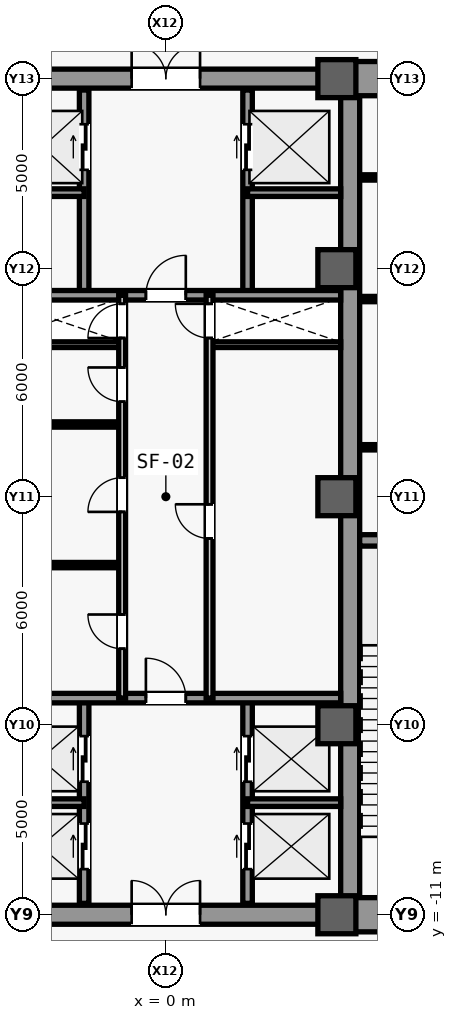
"""IFC4 building model, lengths in metres.
Left out: names, types, materials, properties, quantities, classifications, styles, units other than length and angle.
Written with IfcOpenShell. Run it as: python <this file> out.ifc"""

import sys

from ifc_helpers import new_model, si_unit, direction, frame, frame_2d, origin, origin_2d, place, context, subcontext, project, spatial, rectangle, extrude, source, transform, mapped, element, fill, save


model = new_model("IFC4")
c1 = context("Model", 3, precision=1e-05, world=origin(), true_north=direction((0.0, 1.0)))
c2 = subcontext(c1, "Body", "Model", "MODEL_VIEW")
j1 = project(units=[si_unit("LENGTHUNIT", "METRE"), si_unit("PLANEANGLEUNIT", "RADIAN")], contexts=[c1])
p1 = place(None, origin())
s1 = spatial("IfcSite", under=j1, at=p1, CompositionType="ELEMENT")
p2 = place(p1, origin())
s2 = spatial("IfcBuilding", under=s1, at=p2, CompositionType="ELEMENT")
p3 = place(p2, origin())
s3 = spatial("IfcBuildingStorey", under=s2, at=p3, CompositionType="ELEMENT", Elevation=0.0)
m1 = source(origin(), c2, "Body", "SweptSolid", [
    extrude(rectangle(XDim=21.4, YDim=0.5, at=frame_2d((10.7, 0.0))), origin(), (0.0, 0.0, 1.0), 6.28),
])
p4 = place(p3, frame((4.85, -10.7, 0.0), z_axis=(0.0, 0.0, 1.0), x_axis=(0.0, 1.0, 0.0)))
e1 = element("IfcWall", 1, at=p4, inside=s3, PredefinedType="SHEAR", context=c2, shape_type="MappedRepresentation", body=[
    mapped(m1, transform((0.0, 0.0, 0.0), scale=1.0)),
])
m2 = source(origin(), c2, "Body", "SweptSolid", [
    extrude(rectangle(XDim=5.85, YDim=0.9, at=frame_2d((2.925, 0.0))), origin(), (0.0, 0.0, 1.0), 6.28),
])
p5 = place(p3, frame((4.85, -11.0, 0.0), z_axis=(0.0, 0.0, 1.0), x_axis=(1.0, 0.0, 0.0)))
e2 = element("IfcWall", 2, at=p5, inside=s3, PredefinedType="SHEAR", context=c2, shape_type="MappedRepresentation", body=[
    mapped(m2, transform((0.0, 0.0, 0.0), scale=1.0)),
])
p6 = place(p3, frame((4.85, 11.0, 0.0), z_axis=(0.0, 0.0, 1.0), x_axis=(1.0, 0.0, 0.0)))
e3 = element("IfcWall", 3, at=p6, inside=s3, PredefinedType="SHEAR", context=c2, shape_type="MappedRepresentation", body=[
    mapped(m2, transform((0.0, 0.0, 0.0), scale=1.0)),
])
m3 = source(origin(), c2, "Body", "SweptSolid", [
    extrude(rectangle(XDim=1.05, YDim=2.2, at=frame_2d((0.525, 1.1))), frame((0.0, 0.46, 0.0), z_axis=(0.0, -1.0, 0.0), x_axis=(1.0, 0.0, 0.0)), (0.0, 0.0, 1.0), 0.92),
])
p7 = place(p6, frame((1.375, 0.0, 0.0)))
e4 = element("IfcOpeningElement", 4, at=p7, cuts=e3, PredefinedType="OPENING", context=c2, shape_type="MappedRepresentation", body=[
    mapped(m3, transform((0.0, 0.0, 0.0), scale=1.0)),
])
m4 = source(origin(), c2, "Body", "SweptSolid", [
    extrude(rectangle(XDim=5.6, YDim=0.3, at=frame_2d((2.8, 0.0))), origin(), (0.0, 0.0, 1.0), 6.28),
])
p8 = place(p3, frame((5.1, -1.15, 0.0), z_axis=(0.0, 0.0, 1.0), x_axis=(1.0, 0.0, 0.0)))
e5 = element("IfcWall", 5, at=p8, inside=s3, PredefinedType="SHEAR", context=c2, shape_type="MappedRepresentation", body=[
    mapped(m4, transform((0.0, 0.0, 0.0), scale=1.0)),
])
m5 = source(origin(), c2, "Body", "SweptSolid", [
    extrude(rectangle(XDim=9.2, YDim=0.5, at=frame_2d((4.6, 0.0))), origin(), (0.0, 0.0, 1.0), 6.28),
])
p9 = place(p3, frame((-4.6, -11.0, 0.0), z_axis=(0.0, 0.0, 1.0), x_axis=(1.0, 0.0, 0.0)))
e6 = element("IfcWall", 6, at=p9, inside=s3, PredefinedType="SHEAR", context=c2, shape_type="MappedRepresentation", body=[
    mapped(m5, transform((0.0, 0.0, 0.0), scale=1.0)),
])
m6 = source(origin(), c2, "Body", "SweptSolid", [
    extrude(rectangle(XDim=1.8, YDim=2.25, at=frame_2d((0.9, 1.125))), frame((0.0, 0.26, 0.0), z_axis=(0.0, -1.0, 0.0), x_axis=(1.0, 0.0, 0.0)), (0.0, 0.0, 1.0), 0.52),
])
p10 = place(p9, frame((3.7, 0.0, 0.0)))
e7 = element("IfcOpeningElement", 7, at=p10, cuts=e6, PredefinedType="OPENING", context=c2, shape_type="MappedRepresentation", body=[
    mapped(m6, transform((0.0, 0.0, 0.0), scale=1.0)),
])
p11 = place(p3, frame((-4.6, 11.0, 0.0), z_axis=(0.0, 0.0, 1.0), x_axis=(1.0, 0.0, 0.0)))
e8 = element("IfcWall", 8, at=p11, inside=s3, PredefinedType="SHEAR", context=c2, shape_type="MappedRepresentation", body=[
    mapped(m5, transform((0.0, 0.0, 0.0), scale=1.0)),
])
p12 = place(p11, frame((3.7, 0.0, 0.0)))
e9 = element("IfcOpeningElement", 9, at=p12, cuts=e8, PredefinedType="OPENING", context=c2, shape_type="MappedRepresentation", body=[
    mapped(m6, transform((0.0, 0.0, 0.0), scale=1.0)),
])
m7 = source(origin(), c2, "Body", "SweptSolid", [
    extrude(rectangle(XDim=1.0, YDim=1.0, at=origin_2d()), origin(), (0.0, 0.0, 1.0), 6.6),
])
for number, where, z_axis, x_axis in (
    (10, (4.5, -11.0, 0.0), (0.0, 0.0, 1.0), (1.0, 0.0, 0.0)),
    (11, (4.5, -6.0, 0.0), (0.0, 0.0, 1.0), (1.0, 0.0, 0.0)),
    (12, (4.5, 0.0, 0.0), (0.0, 0.0, 1.0), (1.0, 0.0, 0.0)),
    (13, (4.5, 6.0, 0.0), (0.0, 0.0, 1.0), (1.0, 0.0, 0.0)),
    (14, (4.5, 11.0, 0.0), (0.0, 0.0, 1.0), (1.0, 0.0, 0.0)),
):
    element("IfcColumn", number, at=place(p3, frame(where, z_axis=z_axis, x_axis=x_axis)), inside=s3, PredefinedType="COLUMN", context=c2, shape_type="MappedRepresentation", body=[
        mapped(m7, transform((0.0, 0.0, 0.0), scale=1.0)),
    ])
m8 = source(origin(), c2, "Body", "SweptSolid", [
    extrude(rectangle(XDim=3.15, YDim=0.14, at=frame_2d((1.575, 0.0))), origin(), (0.0, 0.0, 1.0), 6.28),
])
p13 = place(p3, frame((5.1, 1.3, 0.0), z_axis=(0.0, 0.0, 1.0), x_axis=(1.0, 0.0, 0.0)))
e15 = element("IfcWall", 15, at=p13, inside=s3, PredefinedType="PARTITIONING", context=c2, shape_type="MappedRepresentation", body=[
    mapped(m8, transform((0.0, 0.0, 0.0), scale=1.0)),
])
p14 = place(p3, frame((5.1, 8.4, 0.0), z_axis=(0.0, 0.0, 1.0), x_axis=(1.0, 0.0, 0.0)))
e16 = element("IfcWall", 16, at=p14, inside=s3, PredefinedType="PARTITIONING", context=c2, shape_type="MappedRepresentation", body=[
    mapped(m8, transform((0.0, 0.0, 0.0), scale=1.0)),
])
m9 = source(origin(), c2, "Body", "SweptSolid", [
    extrude(rectangle(XDim=0.9, YDim=2.15, at=frame_2d((0.45, 1.075))), frame((0.0, 0.08, 0.0), z_axis=(0.0, -1.0, 0.0), x_axis=(1.0, 0.0, 0.0)), (0.0, 0.0, 1.0), 0.16),
])
p15 = place(p14, frame((1.13, 0.0, 0.0)))
e17 = element("IfcOpeningElement", 17, at=p15, cuts=e16, PredefinedType="OPENING", context=c2, shape_type="MappedRepresentation", body=[
    mapped(m9, transform((0.0, 0.0, 0.0), scale=1.0)),
])
p16 = place(p3, frame((5.1, 5.2, 0.0), z_axis=(0.0, 0.0, 1.0), x_axis=(1.0, 0.0, 0.0)))
e18 = element("IfcWall", 18, at=p16, inside=s3, PredefinedType="PARTITIONING", context=c2, shape_type="MappedRepresentation", body=[
    mapped(m8, transform((0.0, 0.0, 0.0), scale=1.0)),
])
p17 = place(p16, frame((1.13, 0.0, 0.0)))
e19 = element("IfcOpeningElement", 19, at=p17, cuts=e18, PredefinedType="OPENING", context=c2, shape_type="MappedRepresentation", body=[
    mapped(m9, transform((0.0, 0.0, 0.0), scale=1.0)),
])
m10 = source(origin(), c2, "Body", "SweptSolid", [
    extrude(rectangle(XDim=3.45, YDim=0.15, at=frame_2d((1.725, 0.0))), origin(), (0.0, 0.0, 1.0), 6.28),
])
for number, where, z_axis, x_axis in (
    (20, (-4.6, 4.0, 0.0), (0.0, 0.0, 1.0), (1.0, 0.0, 0.0)),
    (21, (1.15, 4.0, 0.0), (0.0, 0.0, 1.0), (1.0, 0.0, 0.0)),
):
    element("IfcWall", number, at=place(p3, frame(where, z_axis=z_axis, x_axis=x_axis)), inside=s3, PredefinedType="PARTITIONING", context=c2, shape_type="MappedRepresentation", body=[
        mapped(m10, transform((0.0, 0.0, 0.0), scale=1.0)),
    ])
m11 = source(origin(), c2, "Body", "SweptSolid", [
    extrude(rectangle(XDim=5.4, YDim=0.25, at=frame_2d((2.7, 0.0))), origin(), (0.0, 0.0, 1.0), 6.28),
])
p18 = place(p3, frame((-2.15, -10.7, 0.0), z_axis=(0.0, 0.0, 1.0), x_axis=(0.0, 1.0, 0.0)))
e22 = element("IfcWall", 22, at=p18, inside=s3, PredefinedType="SHEAR", context=c2, shape_type="MappedRepresentation", body=[
    mapped(m11, transform((0.0, 0.0, 0.0), scale=1.0)),
])
m12 = source(origin(), c2, "Body", "SweptSolid", [
    extrude(rectangle(XDim=1.2, YDim=2.3, at=frame_2d((0.6, 1.15))), frame((0.0, 0.135, 0.0), z_axis=(0.0, -1.0, 0.0), x_axis=(1.0, 0.0, 0.0)), (0.0, 0.0, 1.0), 0.27),
])
p19 = place(p18, frame((0.9, 0.0, 0.0)))
e23 = element("IfcOpeningElement", 23, at=p19, cuts=e22, PredefinedType="OPENING", context=c2, shape_type="MappedRepresentation", body=[
    mapped(m12, transform((0.0, 0.0, 0.0), scale=1.0)),
])
p20 = place(p18, frame((3.2, 0.0, 0.0)))
e24 = element("IfcOpeningElement", 24, at=p20, cuts=e22, PredefinedType="OPENING", context=c2, shape_type="MappedRepresentation", body=[
    mapped(m12, transform((0.0, 0.0, 0.0), scale=1.0)),
])
p21 = place(p3, frame((2.15, -10.7, 0.0), z_axis=(0.0, 0.0, 1.0), x_axis=(0.0, 1.0, 0.0)))
e25 = element("IfcWall", 25, at=p21, inside=s3, PredefinedType="SHEAR", context=c2, shape_type="MappedRepresentation", body=[
    mapped(m11, transform((0.0, 0.0, 0.0), scale=1.0)),
])
p22 = place(p21, frame((0.9, 0.0, 0.0)))
e26 = element("IfcOpeningElement", 26, at=p22, cuts=e25, PredefinedType="OPENING", context=c2, shape_type="MappedRepresentation", body=[
    mapped(m12, transform((0.0, 0.0, 0.0), scale=1.0)),
])
p23 = place(p21, frame((3.2, 0.0, 0.0)))
e27 = element("IfcOpeningElement", 27, at=p23, cuts=e25, PredefinedType="OPENING", context=c2, shape_type="MappedRepresentation", body=[
    mapped(m12, transform((0.0, 0.0, 0.0), scale=1.0)),
])
m13 = source(origin(), c2, "Body", "SweptSolid", [
    extrude(rectangle(XDim=2.45, YDim=0.2, at=frame_2d((1.225, 0.0))), origin(), (0.0, 0.0, 1.0), 6.28),
])
for number, where, z_axis, x_axis in (
    (28, (-4.6, -8.05, 0.0), (0.0, 0.0, 1.0), (1.0, 0.0, 0.0)),
    (29, (2.15, -8.05, 0.0), (0.0, 0.0, 1.0), (1.0, 0.0, 0.0)),
):
    element("IfcWall", number, at=place(p3, frame(where, z_axis=z_axis, x_axis=x_axis)), inside=s3, PredefinedType="SHEAR", context=c2, shape_type="MappedRepresentation", body=[
        mapped(m13, transform((0.0, 0.0, 0.0), scale=1.0)),
    ])
m14 = source(origin(), c2, "Body", "SweptSolid", [
    extrude(rectangle(XDim=9.2, YDim=0.25, at=frame_2d((4.6, 0.0))), origin(), (0.0, 0.0, 1.0), 6.28),
])
p24 = place(p3, frame((-4.6, -5.3, 0.0), z_axis=(0.0, 0.0, 1.0), x_axis=(1.0, 0.0, 0.0)))
e30 = element("IfcWall", 30, at=p24, inside=s3, PredefinedType="SHEAR", context=c2, shape_type="MappedRepresentation", body=[
    mapped(m14, transform((0.0, 0.0, 0.0), scale=1.0)),
])
m15 = source(origin(), c2, "Body", "SweptSolid", [
    extrude(rectangle(XDim=1.05, YDim=2.2, at=frame_2d((0.525, 1.1))), frame((0.0, 0.135, 0.0), z_axis=(0.0, -1.0, 0.0), x_axis=(1.0, 0.0, 0.0)), (0.0, 0.0, 1.0), 0.27),
])
p25 = place(p24, frame((4.075, 0.0, 0.0)))
e31 = element("IfcOpeningElement", 31, at=p25, cuts=e30, PredefinedType="OPENING", context=c2, shape_type="MappedRepresentation", body=[
    mapped(m15, transform((0.0, 0.0, 0.0), scale=1.0)),
])
p26 = place(p3, frame((-2.15, 5.3, 0.0), z_axis=(0.0, 0.0, 1.0), x_axis=(0.0, 1.0, 0.0)))
e32 = element("IfcWall", 32, at=p26, inside=s3, PredefinedType="SHEAR", context=c2, shape_type="MappedRepresentation", body=[
    mapped(m11, transform((0.0, 0.0, 0.0), scale=1.0)),
])
p27 = place(p26, frame((3.3, 0.0, 0.0)))
e33 = element("IfcOpeningElement", 33, at=p27, cuts=e32, PredefinedType="OPENING", context=c2, shape_type="MappedRepresentation", body=[
    mapped(m12, transform((0.0, 0.0, 0.0), scale=1.0)),
])
p28 = place(p3, frame((2.15, 5.3, 0.0), z_axis=(0.0, 0.0, 1.0), x_axis=(0.0, 1.0, 0.0)))
e34 = element("IfcWall", 34, at=p28, inside=s3, PredefinedType="SHEAR", context=c2, shape_type="MappedRepresentation", body=[
    mapped(m11, transform((0.0, 0.0, 0.0), scale=1.0)),
])
p29 = place(p28, frame((3.3, 0.0, 0.0)))
e35 = element("IfcOpeningElement", 35, at=p29, cuts=e34, PredefinedType="OPENING", context=c2, shape_type="MappedRepresentation", body=[
    mapped(m12, transform((0.0, 0.0, 0.0), scale=1.0)),
])
for number, where, z_axis, x_axis in (
    (36, (-4.6, 8.0, 0.0), (0.0, 0.0, 1.0), (1.0, 0.0, 0.0)),
    (37, (2.15, 8.0, 0.0), (0.0, 0.0, 1.0), (1.0, 0.0, 0.0)),
):
    element("IfcWall", number, at=place(p3, frame(where, z_axis=z_axis, x_axis=x_axis)), inside=s3, PredefinedType="SHEAR", context=c2, shape_type="MappedRepresentation", body=[
        mapped(m13, transform((0.0, 0.0, 0.0), scale=1.0)),
    ])
p30 = place(p3, frame((-4.6, 5.3, 0.0), z_axis=(0.0, 0.0, 1.0), x_axis=(1.0, 0.0, 0.0)))
e38 = element("IfcWall", 38, at=p30, inside=s3, PredefinedType="SHEAR", context=c2, shape_type="MappedRepresentation", body=[
    mapped(m14, transform((0.0, 0.0, 0.0), scale=1.0)),
])
p31 = place(p30, frame((4.075, 0.0, 0.0)))
e39 = element("IfcOpeningElement", 39, at=p31, cuts=e38, PredefinedType="OPENING", context=c2, shape_type="MappedRepresentation", body=[
    mapped(m15, transform((0.0, 0.0, 0.0), scale=1.0)),
])
m16 = source(origin(), c2, "Body", "SweptSolid", [
    extrude(rectangle(XDim=3.45, YDim=0.14, at=frame_2d((1.725, 0.0))), origin(), (0.0, 0.0, 1.0), 6.28),
])
for number, where, z_axis, x_axis in (
    (40, (-4.6, -1.8, 0.0), (0.0, 0.0, 1.0), (1.0, 0.0, 0.0)),
    (41, (-4.6, 1.9, 0.0), (0.0, 0.0, 1.0), (1.0, 0.0, 0.0)),
):
    element("IfcWall", number, at=place(p3, frame(where, z_axis=z_axis, x_axis=x_axis)), inside=s3, PredefinedType="PARTITIONING", context=c2, shape_type="MappedRepresentation", body=[
        mapped(m16, transform((0.0, 0.0, 0.0), scale=1.0)),
    ])
m17 = source(origin(), c2, "Body", "SweptSolid", [
    extrude(rectangle(XDim=10.6, YDim=0.18, at=frame_2d((5.3, 0.0))), origin(), (0.0, 0.0, 1.0), 6.28),
])
p32 = place(p3, frame((-1.15, -5.3, 0.0), z_axis=(0.0, 0.0, 1.0), x_axis=(0.0, 1.0, 0.0)))
e42 = element("IfcWall", 42, at=p32, inside=s3, PredefinedType="PARTITIONING", context=c2, shape_type="MappedRepresentation", body=[
    mapped(m17, transform((0.0, 0.0, 0.0), scale=1.0)),
])
m18 = source(origin(), c2, "Body", "SweptSolid", [
    extrude(rectangle(XDim=0.9, YDim=2.15, at=frame_2d((0.45, 1.075))), frame((0.0, 0.1, 0.0), z_axis=(0.0, -1.0, 0.0), x_axis=(1.0, 0.0, 0.0)), (0.0, 0.0, 1.0), 0.2),
])
p33 = place(p32, frame((1.3, 0.0, 0.0)))
e43 = element("IfcOpeningElement", 43, at=p33, cuts=e42, PredefinedType="OPENING", context=c2, shape_type="MappedRepresentation", body=[
    mapped(m18, transform((0.0, 0.0, 0.0), scale=1.0)),
])
p34 = place(p32, frame((4.9, 0.0, 0.0)))
e44 = element("IfcOpeningElement", 44, at=p34, cuts=e42, PredefinedType="OPENING", context=c2, shape_type="MappedRepresentation", body=[
    mapped(m18, transform((0.0, 0.0, 0.0), scale=1.0)),
])
p35 = place(p32, frame((7.8, 0.0, 0.0)))
e45 = element("IfcOpeningElement", 45, at=p35, cuts=e42, PredefinedType="OPENING", context=c2, shape_type="MappedRepresentation", body=[
    mapped(m18, transform((0.0, 0.0, 0.0), scale=1.0)),
])
p36 = place(p32, frame((9.475, 0.0, 0.0)))
e46 = element("IfcOpeningElement", 46, at=p36, cuts=e42, PredefinedType="OPENING", context=c2, shape_type="MappedRepresentation", body=[
    mapped(m18, transform((0.0, 0.0, 0.0), scale=1.0)),
])
p37 = place(p3, frame((1.15, -5.3, 0.0), z_axis=(0.0, 0.0, 1.0), x_axis=(0.0, 1.0, 0.0)))
e47 = element("IfcWall", 47, at=p37, inside=s3, PredefinedType="PARTITIONING", context=c2, shape_type="MappedRepresentation", body=[
    mapped(m17, transform((0.0, 0.0, 0.0), scale=1.0)),
])
p38 = place(p37, frame((4.2, 0.0, 0.0)))
e48 = element("IfcOpeningElement", 48, at=p38, cuts=e47, PredefinedType="OPENING", context=c2, shape_type="MappedRepresentation", body=[
    mapped(m18, transform((0.0, 0.0, 0.0), scale=1.0)),
])
p39 = place(p37, frame((9.475, 0.0, 0.0)))
e49 = element("IfcOpeningElement", 49, at=p39, cuts=e47, PredefinedType="OPENING", context=c2, shape_type="MappedRepresentation", body=[
    mapped(m18, transform((0.0, 0.0, 0.0), scale=1.0)),
])
m19 = source(origin(), c2, "Body", "SweptSolid", [
    extrude(rectangle(XDim=1.05, YDim=2.2, at=frame_2d((0.525, 1.1))), frame((0.0, 0.025, 0.0), z_axis=(0.0, -1.0, 0.0), x_axis=(1.0, 0.0, 0.0)), (0.0, 0.0, 1.0), 0.05),
])
p40 = place(p25, origin())
e50 = element("IfcDoor", 50, at=p40, inside=s3, OperationType="SINGLE_SWING_LEFT", PredefinedType="DOOR", context=c2, shape_type="MappedRepresentation", body=[
    mapped(m19, transform((0.0, 0.0, 0.0), scale=1.0)),
])
fill(e31, e50)
m20 = source(origin(), c2, "Body", "SweptSolid", [
    extrude(rectangle(XDim=1.8, YDim=2.25, at=frame_2d((0.9, 1.125))), frame((0.0, 0.025, 0.0), z_axis=(0.0, -1.0, 0.0), x_axis=(1.0, 0.0, 0.0)), (0.0, 0.0, 1.0), 0.05),
])
p41 = place(p10, origin())
e51 = element("IfcDoor", 51, at=p41, inside=s3, OperationType="SINGLE_SWING_LEFT", PredefinedType="DOOR", context=c2, shape_type="MappedRepresentation", body=[
    mapped(m20, transform((0.0, 0.0, 0.0), scale=1.0)),
])
fill(e7, e51)
p42 = place(p31, origin())
e52 = element("IfcDoor", 52, at=p42, inside=s3, OperationType="SINGLE_SWING_RIGHT", PredefinedType="DOOR", context=c2, shape_type="MappedRepresentation", body=[
    mapped(m19, transform((0.0, 0.0, 0.0), scale=1.0)),
])
fill(e39, e52)
p43 = place(p12, origin())
e53 = element("IfcDoor", 53, at=p43, inside=s3, OperationType="SINGLE_SWING_RIGHT", PredefinedType="DOOR", context=c2, shape_type="MappedRepresentation", body=[
    mapped(m20, transform((0.0, 0.0, 0.0), scale=1.0)),
])
fill(e9, e53)
m21 = source(origin(), c2, "Body", "SweptSolid", [
    extrude(rectangle(XDim=0.9, YDim=2.15, at=frame_2d((0.45, 1.075))), frame((0.0, 0.025, 0.0), z_axis=(0.0, -1.0, 0.0), x_axis=(1.0, 0.0, 0.0)), (0.0, 0.0, 1.0), 0.05),
])
p44 = place(p33, origin())
e54 = element("IfcDoor", 54, at=p44, inside=s3, OperationType="SINGLE_SWING_RIGHT", PredefinedType="DOOR", context=c2, shape_type="MappedRepresentation", body=[
    mapped(m21, transform((0.0, 0.0, 0.0), scale=1.0)),
])
fill(e43, e54)
p45 = place(p34, origin())
e55 = element("IfcDoor", 55, at=p45, inside=s3, OperationType="SINGLE_SWING_LEFT", PredefinedType="DOOR", context=c2, shape_type="MappedRepresentation", body=[
    mapped(m21, transform((0.0, 0.0, 0.0), scale=1.0)),
])
fill(e44, e55)
p46 = place(p35, origin())
e56 = element("IfcDoor", 56, at=p46, inside=s3, OperationType="SINGLE_SWING_RIGHT", PredefinedType="DOOR", context=c2, shape_type="MappedRepresentation", body=[
    mapped(m21, transform((0.0, 0.0, 0.0), scale=1.0)),
])
fill(e45, e56)
p47 = place(p38, origin())
e57 = element("IfcDoor", 57, at=p47, inside=s3, OperationType="SINGLE_SWING_RIGHT", PredefinedType="DOOR", context=c2, shape_type="MappedRepresentation", body=[
    mapped(m21, transform((0.0, 0.0, 0.0), scale=1.0)),
])
fill(e48, e57)
p48 = place(p36, origin())
e58 = element("IfcDoor", 58, at=p48, inside=s3, OperationType="SINGLE_SWING_LEFT", PredefinedType="DOOR", context=c2, shape_type="MappedRepresentation", body=[
    mapped(m21, transform((0.0, 0.0, 0.0), scale=1.0)),
])
fill(e46, e58)
p49 = place(p39, origin())
e59 = element("IfcDoor", 59, at=p49, inside=s3, OperationType="SINGLE_SWING_RIGHT", PredefinedType="DOOR", context=c2, shape_type="MappedRepresentation", body=[
    mapped(m21, transform((0.0, 0.0, 0.0), scale=1.0)),
])
fill(e49, e59)
m22 = source(origin(), c2, "Body", "SweptSolid", [
    extrude(rectangle(XDim=1.2, YDim=2.3, at=frame_2d((0.6, 1.15))), frame((0.0, 0.025, 0.0), z_axis=(0.0, -1.0, 0.0), x_axis=(1.0, 0.0, 0.0)), (0.0, 0.0, 1.0), 0.05),
])
p50 = place(p19, origin())
e60 = element("IfcDoor", 60, at=p50, inside=s3, OperationType="SLIDING_TO_LEFT", PredefinedType="DOOR", context=c2, shape_type="MappedRepresentation", body=[
    mapped(m22, transform((0.0, 0.0, 0.0), scale=1.0)),
])
fill(e23, e60)
p51 = place(p22, origin())
e61 = element("IfcDoor", 61, at=p51, inside=s3, OperationType="SLIDING_TO_LEFT", PredefinedType="DOOR", context=c2, shape_type="MappedRepresentation", body=[
    mapped(m22, transform((0.0, 0.0, 0.0), scale=1.0)),
])
fill(e26, e61)
p52 = place(p20, origin())
e62 = element("IfcDoor", 62, at=p52, inside=s3, OperationType="SLIDING_TO_LEFT", PredefinedType="DOOR", context=c2, shape_type="MappedRepresentation", body=[
    mapped(m22, transform((0.0, 0.0, 0.0), scale=1.0)),
])
fill(e24, e62)
p53 = place(p23, origin())
e63 = element("IfcDoor", 63, at=p53, inside=s3, OperationType="SLIDING_TO_LEFT", PredefinedType="DOOR", context=c2, shape_type="MappedRepresentation", body=[
    mapped(m22, transform((0.0, 0.0, 0.0), scale=1.0)),
])
fill(e27, e63)
p54 = place(p27, origin())
e64 = element("IfcDoor", 64, at=p54, inside=s3, OperationType="SLIDING_TO_LEFT", PredefinedType="DOOR", context=c2, shape_type="MappedRepresentation", body=[
    mapped(m22, transform((0.0, 0.0, 0.0), scale=1.0)),
])
fill(e33, e64)
p55 = place(p29, origin())
e65 = element("IfcDoor", 65, at=p55, inside=s3, OperationType="SLIDING_TO_LEFT", PredefinedType="DOOR", context=c2, shape_type="MappedRepresentation", body=[
    mapped(m22, transform((0.0, 0.0, 0.0), scale=1.0)),
])
fill(e35, e65)
save(model, sys.argv[1])
